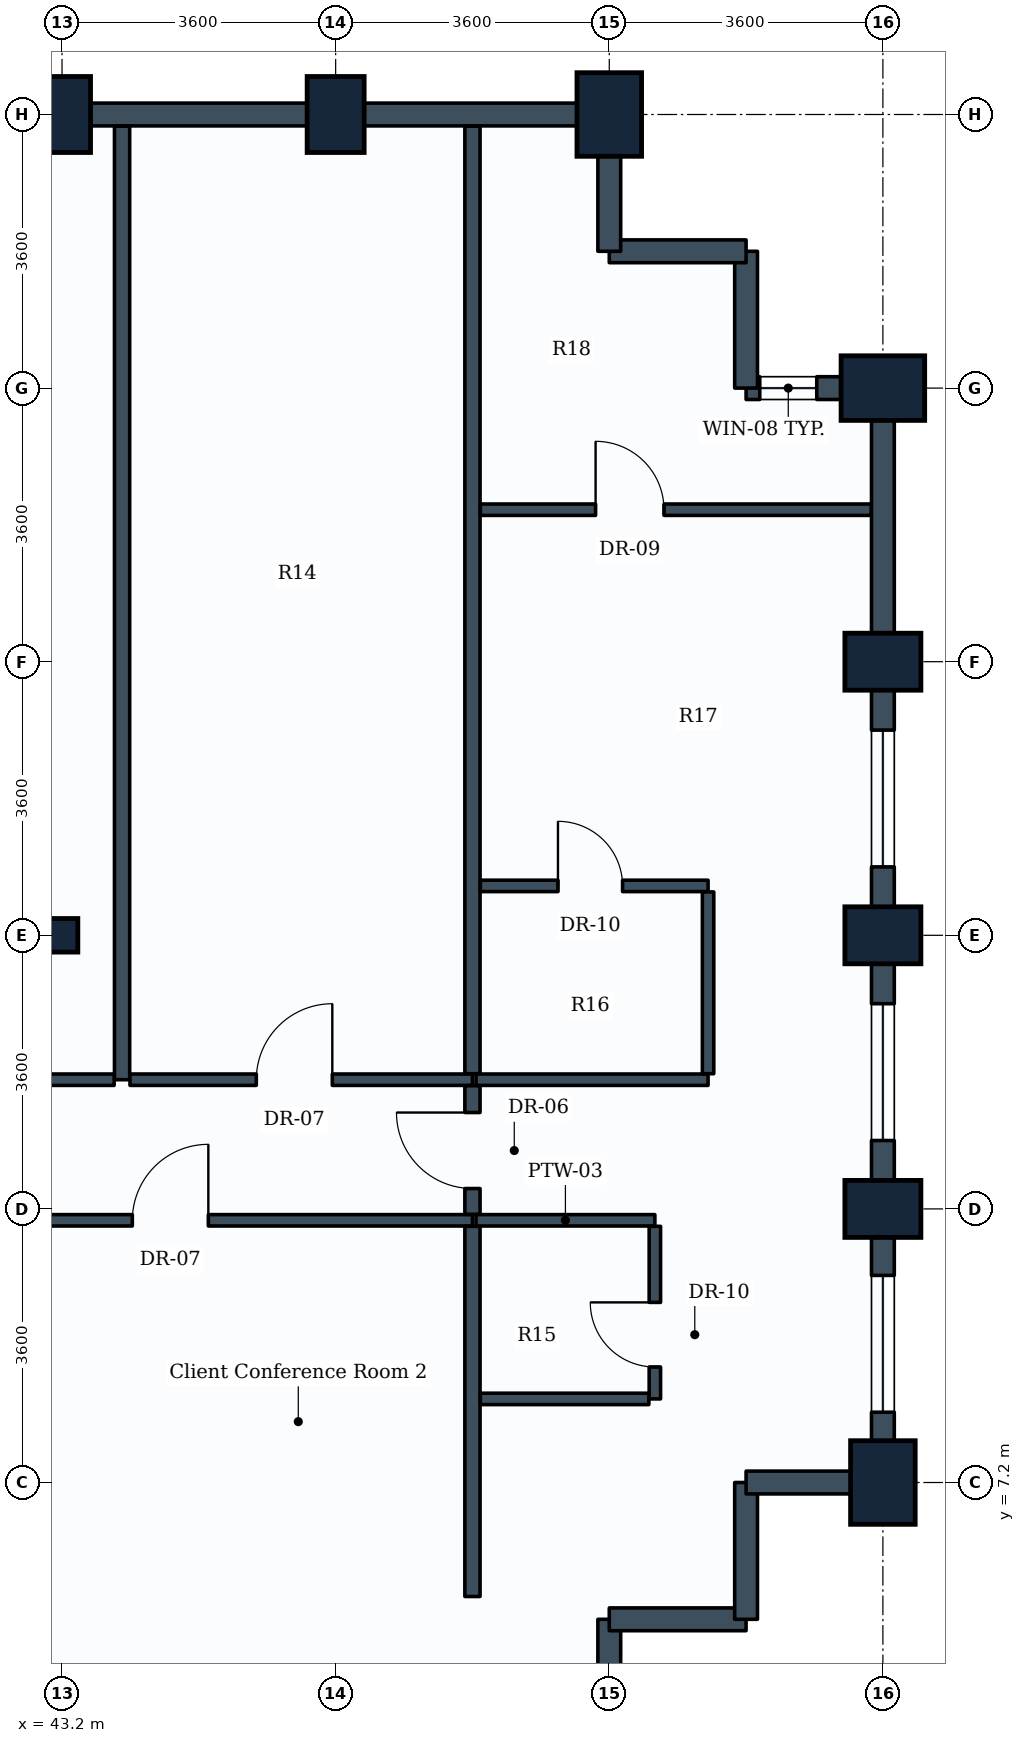
"""IFC4 building model, lengths in metres.
Left out: names, types, materials, properties, quantities, classifications, styles, units other than length and angle.
Written with IfcOpenShell. Run it as: python <this file> out.ifc"""

import sys

from ifc_helpers import new_model, si_unit, direction, frame, frame_2d, origin, origin_2d, place, context, subcontext, project, spatial, rectangle, i_section, extrude, element, fill, save


model = new_model("IFC4")
c1 = context("Model", 3, precision=1e-05, world=origin(), true_north=direction((0.0, 1.0)))
c2 = subcontext(c1, "Body", "Model", "MODEL_VIEW")
j1 = project(units=[si_unit("LENGTHUNIT", "METRE"), si_unit("PLANEANGLEUNIT", "RADIAN")], contexts=[c1])
p1 = place(None, origin())
s1 = spatial("IfcSite", under=j1, at=p1, CompositionType="ELEMENT")
p2 = place(p1, origin())
s2 = spatial("IfcBuilding", under=s1, at=p2, CompositionType="ELEMENT")
p3 = place(p2, frame((0.0, 0.0, 165.6)))
s3 = spatial("IfcBuildingStorey", under=s2, at=p3, CompositionType="ELEMENT", Elevation=165.6)
p4 = place(p3, frame((43.2, 14.4, 0.0), z_axis=(0.0, 0.0, 1.0), x_axis=(1.0, 0.0, 0.0)))
e1 = element("IfcColumn", 1, at=p4, inside=s3, PredefinedType="COLUMN", context=c2, shape_type="SweptSolid", body=[
    extrude(i_section(OverallWidth=0.416, OverallDepth=0.442, WebThickness=0.025, FlangeThickness=0.041, FilletRadius=0.015, at=origin_2d()), origin(), (0.0, 0.0, 1.0), 3.8),
])
for number, where, z_axis, x_axis in (
    (2, (43.2, 25.2, 0.0), (0.0, 0.0, 1.0), (1.0, 0.0, 0.0)),
    (3, (46.8, 25.2, 0.0), (0.0, 0.0, 1.0), (1.0, 0.0, 0.0)),
):
    element("IfcColumn", number, at=place(p3, frame(where, z_axis=z_axis, x_axis=x_axis)), inside=s3, PredefinedType="COLUMN", context=c2, shape_type="SweptSolid", body=[
        extrude(rectangle(XDim=0.75, YDim=1.0, at=origin_2d()), origin(), (0.0, 0.0, 1.0), 3.8),
    ])
for number, where, z_axis, x_axis in (
    (4, (50.4, 25.2, 0.0), (0.0, 0.0, 1.0), (1.0, 0.0, 0.0)),
    (5, (54.0, 7.2, 0.0), (0.0, 0.0, 1.0), (1.0, 0.0, 0.0)),
):
    element("IfcColumn", number, at=place(p3, frame(where, z_axis=z_axis, x_axis=x_axis)), inside=s3, PredefinedType="COLUMN", context=c2, shape_type="SweptSolid", body=[
        extrude(rectangle(XDim=0.85, YDim=1.1, at=origin_2d()), origin(), (0.0, 0.0, 1.0), 3.8),
    ])
for number, where, z_axis, x_axis in (
    (6, (54.0, 10.8, 0.0), (0.0, 0.0, 1.0), (0.0, 1.0, 0.0)),
    (7, (54.0, 14.4, 0.0), (0.0, 0.0, 1.0), (0.0, 1.0, 0.0)),
    (8, (54.0, 18.0, 0.0), (0.0, 0.0, 1.0), (0.0, 1.0, 0.0)),
):
    element("IfcColumn", number, at=place(p3, frame(where, z_axis=z_axis, x_axis=x_axis)), inside=s3, PredefinedType="COLUMN", context=c2, shape_type="SweptSolid", body=[
        extrude(rectangle(XDim=0.75, YDim=1.0, at=origin_2d()), origin(), (0.0, 0.0, 1.0), 3.8),
    ])
p5 = place(p3, frame((54.0, 21.6, 0.0), z_axis=(0.0, 0.0, 1.0), x_axis=(0.0, 1.0, 0.0)))
e9 = element("IfcColumn", 9, at=p5, inside=s3, PredefinedType="COLUMN", context=c2, shape_type="SweptSolid", body=[
    extrude(rectangle(XDim=0.85, YDim=1.1, at=origin_2d()), origin(), (0.0, 0.0, 1.0), 3.8),
])
p6 = place(p3, frame((50.4, 5.4, 0.0), z_axis=(0.0, 0.0, 1.0), x_axis=(0.0, -1.0, 0.0)))
e10 = element("IfcWall", 10, at=p6, inside=s3, PredefinedType="STANDARD", context=c2, shape_type="SweptSolid", body=[
    extrude(rectangle(XDim=1.8, YDim=0.3, at=frame_2d((0.9, 0.0))), origin(), (0.0, 0.0, 1.0), 2.93),
])
for number, where, z_axis, x_axis in (
    (11, (52.2, 5.4, 0.0), (0.0, 0.0, 1.0), (-1.0, 0.0, 0.0)),
    (12, (52.2, 7.2, 0.0), (0.0, 0.0, 1.0), (0.0, -1.0, 0.0)),
):
    element("IfcWall", number, at=place(p3, frame(where, z_axis=z_axis, x_axis=x_axis)), inside=s3, PredefinedType="STANDARD", context=c2, shape_type="SweptSolid", body=[
        extrude(rectangle(XDim=1.8, YDim=0.3, at=frame_2d((0.9, 0.0))), origin(), (0.0, 0.0, 1.0), 3.465),
    ])
p7 = place(p3, frame((54.0, 7.2, 0.0), z_axis=(0.0, 0.0, 1.0), x_axis=(-1.0, 0.0, 0.0)))
e13 = element("IfcWall", 13, at=p7, inside=s3, PredefinedType="STANDARD", context=c2, shape_type="SweptSolid", body=[
    extrude(rectangle(XDim=1.8, YDim=0.3, at=frame_2d((0.9, 0.0))), origin(), (0.0, 0.0, 1.0), 2.93),
])
p8 = place(p3, frame((54.0, 10.8, 0.0), z_axis=(0.0, 0.0, 1.0), x_axis=(0.0, -1.0, 0.0)))
e14 = element("IfcWall", 14, at=p8, inside=s3, PredefinedType="STANDARD", context=c2, shape_type="SweptSolid", body=[
    extrude(rectangle(XDim=3.6, YDim=0.3, at=frame_2d((1.8, 0.0))), origin(), (0.0, 0.0, 1.0), 2.93),
])
p9 = place(p8, frame((0.875, 0.0, 0.85)))
e15 = element("IfcOpeningElement", 15, at=p9, cuts=e14, PredefinedType="OPENING", context=c2, shape_type="SweptSolid", body=[
    extrude(rectangle(XDim=1.8, YDim=1.35, at=frame_2d((0.9, 0.675))), frame((0.0, 0.16, 0.0), z_axis=(0.0, -1.0, 0.0), x_axis=(1.0, 0.0, 0.0)), (0.0, 0.0, 1.0), 0.32),
])
p10 = place(p3, frame((54.0, 14.4, 0.0), z_axis=(0.0, 0.0, 1.0), x_axis=(0.0, -1.0, 0.0)))
e16 = element("IfcWall", 16, at=p10, inside=s3, PredefinedType="STANDARD", context=c2, shape_type="SweptSolid", body=[
    extrude(rectangle(XDim=3.6, YDim=0.3, at=frame_2d((1.8, 0.0))), origin(), (0.0, 0.0, 1.0), 2.93),
])
p11 = place(p10, frame((0.9, 0.0, 0.85)))
e17 = element("IfcOpeningElement", 17, at=p11, cuts=e16, PredefinedType="OPENING", context=c2, shape_type="SweptSolid", body=[
    extrude(rectangle(XDim=1.8, YDim=1.35, at=frame_2d((0.9, 0.675))), frame((0.0, 0.16, 0.0), z_axis=(0.0, -1.0, 0.0), x_axis=(1.0, 0.0, 0.0)), (0.0, 0.0, 1.0), 0.32),
])
p12 = place(p3, frame((54.0, 18.0, 0.0), z_axis=(0.0, 0.0, 1.0), x_axis=(0.0, -1.0, 0.0)))
e18 = element("IfcWall", 18, at=p12, inside=s3, PredefinedType="STANDARD", context=c2, shape_type="SweptSolid", body=[
    extrude(rectangle(XDim=3.6, YDim=0.3, at=frame_2d((1.8, 0.0))), origin(), (0.0, 0.0, 1.0), 2.93),
])
p13 = place(p12, frame((0.9, 0.0, 0.85)))
e19 = element("IfcOpeningElement", 19, at=p13, cuts=e18, PredefinedType="OPENING", context=c2, shape_type="SweptSolid", body=[
    extrude(rectangle(XDim=1.8, YDim=1.35, at=frame_2d((0.9, 0.675))), frame((0.0, 0.16, 0.0), z_axis=(0.0, -1.0, 0.0), x_axis=(1.0, 0.0, 0.0)), (0.0, 0.0, 1.0), 0.32),
])
p14 = place(p3, frame((54.0, 21.6, 0.0), z_axis=(0.0, 0.0, 1.0), x_axis=(0.0, -1.0, 0.0)))
e20 = element("IfcWall", 20, at=p14, inside=s3, PredefinedType="STANDARD", context=c2, shape_type="SweptSolid", body=[
    extrude(rectangle(XDim=3.6, YDim=0.3, at=frame_2d((1.8, 0.0))), origin(), (0.0, 0.0, 1.0), 2.93),
])
p15 = place(p3, frame((52.2, 21.6, 0.0), z_axis=(0.0, 0.0, 1.0), x_axis=(1.0, 0.0, 0.0)))
e21 = element("IfcWall", 21, at=p15, inside=s3, PredefinedType="STANDARD", context=c2, shape_type="SweptSolid", body=[
    extrude(rectangle(XDim=1.8, YDim=0.3, at=frame_2d((0.9, 0.0))), origin(), (0.0, 0.0, 1.0), 2.93),
])
p16 = place(p15, frame((0.18, 0.0, 0.85)))
e22 = element("IfcOpeningElement", 22, at=p16, cuts=e21, PredefinedType="OPENING", context=c2, shape_type="SweptSolid", body=[
    extrude(rectangle(XDim=0.75, YDim=1.05, at=frame_2d((0.375, 0.525))), frame((0.0, 0.16, 0.0), z_axis=(0.0, -1.0, 0.0), x_axis=(1.0, 0.0, 0.0)), (0.0, 0.0, 1.0), 0.32),
])
p17 = place(p3, frame((52.2, 23.4, 0.0), z_axis=(0.0, 0.0, 1.0), x_axis=(0.0, -1.0, 0.0)))
e23 = element("IfcWall", 23, at=p17, inside=s3, PredefinedType="STANDARD", context=c2, shape_type="SweptSolid", body=[
    extrude(rectangle(XDim=1.8, YDim=0.3, at=frame_2d((0.9, 0.0))), origin(), (0.0, 0.0, 1.0), 3.465),
])
p18 = place(p3, frame((50.4, 23.4, 0.0), z_axis=(0.0, 0.0, 1.0), x_axis=(1.0, 0.0, 0.0)))
e24 = element("IfcWall", 24, at=p18, inside=s3, PredefinedType="STANDARD", context=c2, shape_type="SweptSolid", body=[
    extrude(rectangle(XDim=1.8, YDim=0.3, at=frame_2d((0.9, 0.0))), origin(), (0.0, 0.0, 1.0), 3.465),
])
p19 = place(p3, frame((50.4, 25.2, 0.0), z_axis=(0.0, 0.0, 1.0), x_axis=(0.0, -1.0, 0.0)))
e25 = element("IfcWall", 25, at=p19, inside=s3, PredefinedType="STANDARD", context=c2, shape_type="SweptSolid", body=[
    extrude(rectangle(XDim=1.8, YDim=0.3, at=frame_2d((0.9, 0.0))), origin(), (0.0, 0.0, 1.0), 2.93),
])
p20 = place(p3, frame((46.8, 25.2, 0.0), z_axis=(0.0, 0.0, 1.0), x_axis=(1.0, 0.0, 0.0)))
e26 = element("IfcWall", 26, at=p20, inside=s3, PredefinedType="STANDARD", context=c2, shape_type="SweptSolid", body=[
    extrude(rectangle(XDim=3.6, YDim=0.3, at=frame_2d((1.8, 0.0))), origin(), (0.0, 0.0, 1.0), 2.93),
])
p21 = place(p3, frame((43.2, 25.2, 0.0), z_axis=(0.0, 0.0, 1.0), x_axis=(1.0, 0.0, 0.0)))
e27 = element("IfcWall", 27, at=p21, inside=s3, PredefinedType="STANDARD", context=c2, shape_type="SweptSolid", body=[
    extrude(rectangle(XDim=3.6, YDim=0.3, at=frame_2d((1.8, 0.0))), origin(), (0.0, 0.0, 1.0), 2.93),
])
p22 = place(p3, frame((39.6, 25.2, 0.0), z_axis=(0.0, 0.0, 1.0), x_axis=(1.0, 0.0, 0.0)))
e28 = element("IfcWall", 28, at=p22, inside=s3, PredefinedType="STANDARD", context=c2, shape_type="SweptSolid", body=[
    extrude(rectangle(XDim=3.6, YDim=0.3, at=frame_2d((1.8, 0.0))), origin(), (0.0, 0.0, 1.0), 2.93),
])
p23 = place(p22, frame((0.9, 0.0, 0.85)))
e29 = element("IfcOpeningElement", 29, at=p23, cuts=e28, PredefinedType="OPENING", context=c2, shape_type="SweptSolid", body=[
    extrude(rectangle(XDim=1.8, YDim=1.35, at=frame_2d((0.9, 0.675))), frame((0.0, 0.16, 0.0), z_axis=(0.0, -1.0, 0.0), x_axis=(1.0, 0.0, 0.0)), (0.0, 0.0, 1.0), 0.32),
])
p24 = place(p3, frame((40.754, 10.65, 0.0), z_axis=(0.0, 0.0, 1.0), x_axis=(1.0, 0.0, 0.0)))
e30 = element("IfcWall", 30, at=p24, inside=s3, PredefinedType="PARTITIONING", context=c2, shape_type="SweptSolid", body=[
    extrude(rectangle(XDim=7.846, YDim=0.15, at=frame_2d((3.923, 0.0))), origin(), (0.0, 0.0, 1.0), 3.1),
])
p25 = place(p24, frame((3.371, 0.0, 0.0)))
e31 = element("IfcOpeningElement", 31, at=p25, cuts=e30, PredefinedType="OPENING", context=c2, shape_type="SweptSolid", body=[
    extrude(rectangle(XDim=1.0, YDim=2.1, at=frame_2d((0.5, 1.05))), frame((0.0, 0.085, 0.0), z_axis=(0.0, -1.0, 0.0), x_axis=(1.0, 0.0, 0.0)), (0.0, 0.0, 1.0), 0.17),
])
p26 = place(p3, frame((43.99, 12.5, 0.0), z_axis=(0.0, 0.0, 1.0), x_axis=(0.0, 1.0, 0.0)))
e32 = element("IfcWall", 32, at=p26, inside=s3, PredefinedType="PARTITIONING", context=c2, shape_type="SweptSolid", body=[
    extrude(rectangle(XDim=12.546, YDim=0.2, at=frame_2d((6.273, 0.0))), origin(), (0.0, 0.0, 1.0), 2.93),
])
p27 = place(p3, frame((39.0, 12.5, 0.0), z_axis=(0.0, 0.0, 1.0), x_axis=(1.0, 0.0, 0.0)))
e33 = element("IfcWall", 33, at=p27, inside=s3, PredefinedType="PARTITIONING", context=c2, shape_type="SweptSolid", body=[
    extrude(rectangle(XDim=4.886, YDim=0.15, at=frame_2d((2.443, 0.0))), origin(), (0.0, 0.0, 1.0), 3.1),
])
p28 = place(p27, frame((0.599, 0.0, 0.0)))
e34 = element("IfcOpeningElement", 34, at=p28, cuts=e33, PredefinedType="OPENING", context=c2, shape_type="SweptSolid", body=[
    extrude(rectangle(XDim=1.0, YDim=2.1, at=frame_2d((0.5, 1.05))), frame((0.0, 0.085, 0.0), z_axis=(0.0, -1.0, 0.0), x_axis=(1.0, 0.0, 0.0)), (0.0, 0.0, 1.0), 0.17),
])
p29 = place(p3, frame((44.094, 12.5, 0.0), z_axis=(0.0, 0.0, 1.0), x_axis=(1.0, 0.0, 0.0)))
e35 = element("IfcWall", 35, at=p29, inside=s3, PredefinedType="PARTITIONING", context=c2, shape_type="SweptSolid", body=[
    extrude(rectangle(XDim=4.506, YDim=0.15, at=frame_2d((2.253, 0.0))), origin(), (0.0, 0.0, 1.0), 3.1),
])
p30 = place(p29, frame((1.662, 0.0, 0.0)))
e36 = element("IfcOpeningElement", 36, at=p30, cuts=e35, PredefinedType="OPENING", context=c2, shape_type="SweptSolid", body=[
    extrude(rectangle(XDim=1.0, YDim=2.1, at=frame_2d((0.5, 1.05))), frame((0.0, 0.085, 0.0), z_axis=(0.0, -1.0, 0.0), x_axis=(1.0, 0.0, 0.0)), (0.0, 0.0, 1.0), 0.17),
])
p31 = place(p3, frame((48.6, 5.7, 0.0), z_axis=(0.0, 0.0, 1.0), x_axis=(0.0, 1.0, 0.0)))
e37 = element("IfcWall", 37, at=p31, inside=s3, PredefinedType="PARTITIONING", context=c2, shape_type="SweptSolid", body=[
    extrude(rectangle(XDim=4.871, YDim=0.2, at=frame_2d((2.436, 0.0))), origin(), (0.0, 0.0, 1.0), 3.465),
])
p32 = place(p3, frame((48.6, 12.579, 0.0), z_axis=(0.0, 0.0, 1.0), x_axis=(0.0, 1.0, 0.0)))
e38 = element("IfcWall", 38, at=p32, inside=s3, PredefinedType="PARTITIONING", context=c2, shape_type="SweptSolid", body=[
    extrude(rectangle(XDim=12.467, YDim=0.2, at=frame_2d((6.233, 0.0))), origin(), (0.0, 0.0, 1.0), 2.93),
])
p33 = place(p3, frame((48.6, 10.729, 0.0), z_axis=(0.0, 0.0, 1.0), x_axis=(0.0, 1.0, 0.0)))
e39 = element("IfcWall", 39, at=p33, inside=s3, PredefinedType="PARTITIONING", context=c2, shape_type="SweptSolid", body=[
    extrude(rectangle(XDim=1.692, YDim=0.2, at=frame_2d((0.846, 0.0))), origin(), (0.0, 0.0, 1.0), 3.465),
])
p34 = place(p33, frame((0.339, 0.0, 0.0)))
e40 = element("IfcOpeningElement", 40, at=p34, cuts=e39, PredefinedType="OPENING", context=c2, shape_type="SweptSolid", body=[
    extrude(rectangle(XDim=1.0, YDim=2.1, at=frame_2d((0.5, 1.05))), frame((0.0, 0.11, 0.0), z_axis=(0.0, -1.0, 0.0), x_axis=(1.0, 0.0, 0.0)), (0.0, 0.0, 1.0), 0.22),
])
p35 = place(p3, frame((48.646, 10.65, 0.0), z_axis=(0.0, 0.0, 1.0), x_axis=(1.0, 0.0, 0.0)))
e41 = element("IfcWall", 41, at=p35, inside=s3, PredefinedType="PARTITIONING", context=c2, shape_type="SweptSolid", body=[
    extrude(rectangle(XDim=2.354, YDim=0.15, at=frame_2d((1.177, 0.0))), origin(), (0.0, 0.0, 1.0), 3.465),
])
p36 = place(p3, frame((51.0, 8.3, 0.0), z_axis=(0.0, 0.0, 1.0), x_axis=(0.0, 1.0, 0.0)))
e42 = element("IfcWall", 42, at=p36, inside=s3, PredefinedType="PARTITIONING", context=c2, shape_type="SweptSolid", body=[
    extrude(rectangle(XDim=2.271, YDim=0.15, at=frame_2d((1.135, 0.0))), origin(), (0.0, 0.0, 1.0), 3.465),
])
p37 = place(p36, frame((0.42, 0.0, 0.0)))
e43 = element("IfcOpeningElement", 43, at=p37, cuts=e42, PredefinedType="OPENING", context=c2, shape_type="SweptSolid", body=[
    extrude(rectangle(XDim=0.85, YDim=2.1, at=frame_2d((0.425, 1.05))), frame((0.0, 0.085, 0.0), z_axis=(0.0, -1.0, 0.0), x_axis=(1.0, 0.0, 0.0)), (0.0, 0.0, 1.0), 0.17),
])
p38 = place(p3, frame((48.704, 8.3, 0.0), z_axis=(0.0, 0.0, 1.0), x_axis=(1.0, 0.0, 0.0)))
e44 = element("IfcWall", 44, at=p38, inside=s3, PredefinedType="PARTITIONING", context=c2, shape_type="SweptSolid", body=[
    extrude(rectangle(XDim=2.217, YDim=0.15, at=frame_2d((1.108, 0.0))), origin(), (0.0, 0.0, 1.0), 3.465),
])
p39 = place(p3, frame((48.704, 20.0, 0.0), z_axis=(0.0, 0.0, 1.0), x_axis=(1.0, 0.0, 0.0)))
e45 = element("IfcWall", 45, at=p39, inside=s3, PredefinedType="PARTITIONING", context=c2, shape_type="SweptSolid", body=[
    extrude(rectangle(XDim=5.142, YDim=0.15, at=frame_2d((2.571, 0.0))), origin(), (0.0, 0.0, 1.0), 2.93),
])
p40 = place(p39, frame((1.516, 0.0, 0.0)))
e46 = element("IfcOpeningElement", 46, at=p40, cuts=e45, PredefinedType="OPENING", context=c2, shape_type="SweptSolid", body=[
    extrude(rectangle(XDim=0.9, YDim=2.1, at=frame_2d((0.45, 1.05))), frame((0.0, 0.085, 0.0), z_axis=(0.0, -1.0, 0.0), x_axis=(1.0, 0.0, 0.0)), (0.0, 0.0, 1.0), 0.17),
])
p41 = place(p3, frame((48.646, 12.5, 0.0), z_axis=(0.0, 0.0, 1.0), x_axis=(1.0, 0.0, 0.0)))
e47 = element("IfcWall", 47, at=p41, inside=s3, PredefinedType="PARTITIONING", context=c2, shape_type="SweptSolid", body=[
    extrude(rectangle(XDim=3.054, YDim=0.15, at=frame_2d((1.527, 0.0))), origin(), (0.0, 0.0, 1.0), 3.465),
])
p42 = place(p3, frame((48.704, 15.05, 0.0), z_axis=(0.0, 0.0, 1.0), x_axis=(1.0, 0.0, 0.0)))
e48 = element("IfcWall", 48, at=p42, inside=s3, PredefinedType="PARTITIONING", context=c2, shape_type="SweptSolid", body=[
    extrude(rectangle(XDim=2.996, YDim=0.15, at=frame_2d((1.498, 0.0))), origin(), (0.0, 0.0, 1.0), 3.465),
])
p43 = place(p42, frame((1.021, 0.0, 0.0)))
e49 = element("IfcOpeningElement", 49, at=p43, cuts=e48, PredefinedType="OPENING", context=c2, shape_type="SweptSolid", body=[
    extrude(rectangle(XDim=0.85, YDim=2.1, at=frame_2d((0.425, 1.05))), frame((0.0, 0.085, 0.0), z_axis=(0.0, -1.0, 0.0), x_axis=(1.0, 0.0, 0.0)), (0.0, 0.0, 1.0), 0.17),
])
p44 = place(p3, frame((51.7, 12.579, 0.0), z_axis=(0.0, 0.0, 1.0), x_axis=(0.0, 1.0, 0.0)))
e50 = element("IfcWall", 50, at=p44, inside=s3, PredefinedType="PARTITIONING", context=c2, shape_type="SweptSolid", body=[
    extrude(rectangle(XDim=2.392, YDim=0.15, at=frame_2d((1.196, 0.0))), origin(), (0.0, 0.0, 1.0), 3.1),
])
p45 = place(p9, origin())
e51 = element("IfcWindow", 51, at=p45, inside=s3, PartitioningType="SINGLE_PANEL", PredefinedType="WINDOW", context=c2, shape_type="SweptSolid", body=[
    extrude(rectangle(XDim=1.8, YDim=1.35, at=frame_2d((0.9, 0.675))), frame((0.0, 0.03, 0.0), z_axis=(0.0, -1.0, 0.0), x_axis=(1.0, 0.0, 0.0)), (0.0, 0.0, 1.0), 0.06),
])
fill(e15, e51)
p46 = place(p11, origin())
e52 = element("IfcWindow", 52, at=p46, inside=s3, PartitioningType="SINGLE_PANEL", PredefinedType="WINDOW", context=c2, shape_type="SweptSolid", body=[
    extrude(rectangle(XDim=1.8, YDim=1.35, at=frame_2d((0.9, 0.675))), frame((0.0, 0.03, 0.0), z_axis=(0.0, -1.0, 0.0), x_axis=(1.0, 0.0, 0.0)), (0.0, 0.0, 1.0), 0.06),
])
fill(e17, e52)
p47 = place(p13, origin())
e53 = element("IfcWindow", 53, at=p47, inside=s3, PartitioningType="SINGLE_PANEL", PredefinedType="WINDOW", context=c2, shape_type="SweptSolid", body=[
    extrude(rectangle(XDim=1.8, YDim=1.35, at=frame_2d((0.9, 0.675))), frame((0.0, 0.03, 0.0), z_axis=(0.0, -1.0, 0.0), x_axis=(1.0, 0.0, 0.0)), (0.0, 0.0, 1.0), 0.06),
])
fill(e19, e53)
p48 = place(p25, origin())
e54 = element("IfcDoor", 54, at=p48, inside=s3, OperationType="SINGLE_SWING_RIGHT", PredefinedType="DOOR", context=c2, shape_type="SweptSolid", body=[
    extrude(rectangle(XDim=1.0, YDim=2.1, at=frame_2d((0.5, 1.05))), frame((0.0, 0.025, 0.0), z_axis=(0.0, -1.0, 0.0), x_axis=(1.0, 0.0, 0.0)), (0.0, 0.0, 1.0), 0.05),
])
fill(e31, e54)
p49 = place(p30, origin())
e55 = element("IfcDoor", 55, at=p49, inside=s3, OperationType="SINGLE_SWING_RIGHT", PredefinedType="DOOR", context=c2, shape_type="SweptSolid", body=[
    extrude(rectangle(XDim=1.0, YDim=2.1, at=frame_2d((0.5, 1.05))), frame((0.0, 0.025, 0.0), z_axis=(0.0, -1.0, 0.0), x_axis=(1.0, 0.0, 0.0)), (0.0, 0.0, 1.0), 0.05),
])
fill(e36, e55)
p50 = place(p34, origin())
e56 = element("IfcDoor", 56, at=p50, inside=s3, OperationType="SINGLE_SWING_RIGHT", PredefinedType="DOOR", context=c2, shape_type="SweptSolid", body=[
    extrude(rectangle(XDim=1.0, YDim=2.1, at=frame_2d((0.5, 1.05))), frame((0.0, 0.025, 0.0), z_axis=(0.0, -1.0, 0.0), x_axis=(1.0, 0.0, 0.0)), (0.0, 0.0, 1.0), 0.05),
])
fill(e40, e56)
p51 = place(p37, origin())
e57 = element("IfcDoor", 57, at=p51, inside=s3, OperationType="SINGLE_SWING_RIGHT", PredefinedType="DOOR", context=c2, shape_type="SweptSolid", body=[
    extrude(rectangle(XDim=0.85, YDim=2.1, at=frame_2d((0.425, 1.05))), frame((0.0, 0.025, 0.0), z_axis=(0.0, -1.0, 0.0), x_axis=(1.0, 0.0, 0.0)), (0.0, 0.0, 1.0), 0.05),
])
fill(e43, e57)
p52 = place(p40, origin())
e58 = element("IfcDoor", 58, at=p52, inside=s3, OperationType="SINGLE_SWING_LEFT", PredefinedType="DOOR", context=c2, shape_type="SweptSolid", body=[
    extrude(rectangle(XDim=0.9, YDim=2.1, at=frame_2d((0.45, 1.05))), frame((0.0, 0.025, 0.0), z_axis=(0.0, -1.0, 0.0), x_axis=(1.0, 0.0, 0.0)), (0.0, 0.0, 1.0), 0.05),
])
fill(e46, e58)
p53 = place(p43, origin())
e59 = element("IfcDoor", 59, at=p53, inside=s3, OperationType="SINGLE_SWING_LEFT", PredefinedType="DOOR", context=c2, shape_type="SweptSolid", body=[
    extrude(rectangle(XDim=0.85, YDim=2.1, at=frame_2d((0.425, 1.05))), frame((0.0, 0.025, 0.0), z_axis=(0.0, -1.0, 0.0), x_axis=(1.0, 0.0, 0.0)), (0.0, 0.0, 1.0), 0.05),
])
fill(e49, e59)
p54 = place(p16, origin())
e60 = element("IfcWindow", 60, at=p54, inside=s3, PartitioningType="SINGLE_PANEL", PredefinedType="WINDOW", context=c2, shape_type="SweptSolid", body=[
    extrude(rectangle(XDim=0.75, YDim=1.05, at=frame_2d((0.375, 0.525))), frame((0.0, 0.03, 0.0), z_axis=(0.0, -1.0, 0.0), x_axis=(1.0, 0.0, 0.0)), (0.0, 0.0, 1.0), 0.06),
])
fill(e22, e60)
save(model, sys.argv[1])
